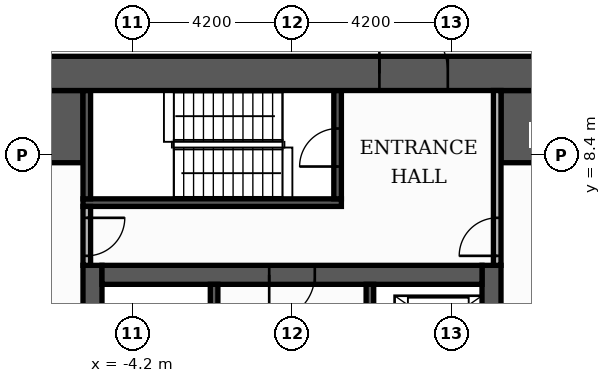
"""IFC4 building model, lengths in metres.
Left out: names, types, materials, properties, quantities, classifications, styles, units other than length and angle.
Written with IfcOpenShell. Run it as: python <this file> out.ifc"""

import sys

from ifc_helpers import new_model, si_unit, direction, frame, frame_2d, origin, place, context, subcontext, project, spatial, rectangle, extrude, element, fill, save


model = new_model("IFC4")
c1 = context("Model", 3, precision=1e-05, world=origin(), true_north=direction((0.0, 1.0)))
c2 = subcontext(c1, "Body", "Model", "MODEL_VIEW")
j1 = project(units=[si_unit("LENGTHUNIT", "METRE"), si_unit("PLANEANGLEUNIT", "RADIAN")], contexts=[c1])
p1 = place(None, origin())
s1 = spatial("IfcSite", under=j1, at=p1, CompositionType="ELEMENT")
p2 = place(p1, origin())
s2 = spatial("IfcBuilding", under=s1, at=p2, CompositionType="ELEMENT")
p3 = place(p2, frame((0.0, 0.0, -4.2)))
s3 = spatial("IfcBuildingStorey", under=s2, at=p3, CompositionType="ELEMENT", Elevation=-4.2)
for number, where, z_axis, x_axis in (
    (1, (-5.25, -5.0, 0.0), (0.0, 0.0, 1.0), (0.0, 1.0, 0.0)),
    (2, (5.25, -5.0, 0.0), (0.0, 0.0, 1.0), (0.0, 1.0, 0.0)),
):
    element("IfcWall", number, at=place(p3, frame(where, z_axis=z_axis, x_axis=x_axis)), inside=s3, PredefinedType="SHEAR", context=c2, shape_type="SweptSolid", body=[
        extrude(rectangle(XDim=10.5, YDim=0.5, at=frame_2d((5.25, 0.0))), origin(), (0.0, 0.0, 1.0), 3.78),
    ])
p4 = place(p3, frame((-5.0, 5.25, 0.0), z_axis=(0.0, 0.0, 1.0), x_axis=(1.0, 0.0, 0.0)))
e3 = element("IfcWall", 3, at=p4, inside=s3, PredefinedType="SHEAR", context=c2, shape_type="SweptSolid", body=[
    extrude(rectangle(XDim=10.0, YDim=0.5, at=frame_2d((5.0, 0.0))), origin(), (0.0, 0.0, 1.0), 3.78),
])
p5 = place(p4, frame((4.4, 0.0, 0.0)))
e4 = element("IfcOpeningElement", 4, at=p5, cuts=e3, PredefinedType="OPENING", context=c2, shape_type="SweptSolid", body=[
    extrude(rectangle(XDim=1.2, YDim=2.1, at=frame_2d((0.6, 1.05))), frame((0.0, 0.26, 0.0), z_axis=(0.0, -1.0, 0.0), x_axis=(1.0, 0.0, 0.0)), (0.0, 0.0, 1.0), 0.52),
])
for number, where, z_axis, x_axis in (
    (5, (-10.1, 9.15, 0.0), (0.0, 0.0, 1.0), (1.0, 0.0, 0.0)),
    (6, (5.5, 9.15, 0.0), (0.0, 0.0, 1.0), (1.0, 0.0, 0.0)),
):
    element("IfcWall", number, at=place(p3, frame(where, z_axis=z_axis, x_axis=x_axis)), inside=s3, PredefinedType="SHEAR", context=c2, shape_type="SweptSolid", body=[
        extrude(rectangle(XDim=4.6, YDim=1.9, at=frame_2d((2.3, 0.0))), origin(), (0.0, 0.0, 1.0), 3.78),
    ])
p6 = place(p3, frame((-2.05, -1.4, 0.0), z_axis=(0.0, 0.0, 1.0), x_axis=(0.0, 1.0, 0.0)))
e7 = element("IfcWall", 7, at=p6, inside=s3, PredefinedType="SHEAR", context=c2, shape_type="SweptSolid", body=[
    extrude(rectangle(XDim=6.4, YDim=0.2, at=frame_2d((3.2, 0.0))), origin(), (0.0, 0.0, 1.0), 3.78),
])
p7 = place(p6, frame((0.15, 0.0, 0.0)))
e8 = element("IfcOpeningElement", 8, at=p7, cuts=e7, PredefinedType="OPENING", context=c2, shape_type="SweptSolid", body=[
    extrude(rectangle(XDim=1.0, YDim=2.1, at=frame_2d((0.5, 1.05))), frame((0.0, 0.11, 0.0), z_axis=(0.0, -1.0, 0.0), x_axis=(1.0, 0.0, 0.0)), (0.0, 0.0, 1.0), 0.22),
])
p8 = place(p3, frame((-5.5, 7.15, 0.0), z_axis=(0.0, 0.0, 1.0), x_axis=(1.0, 0.0, 0.0)))
e9 = element("IfcWall", 9, at=p8, inside=s3, PredefinedType="SHEAR", context=c2, shape_type="SweptSolid", body=[
    extrude(rectangle(XDim=6.8, YDim=0.2, at=frame_2d((3.4, 0.0))), origin(), (0.0, 0.0, 1.0), 3.78),
])
p9 = place(p3, frame((-5.4, 7.25, 0.0), z_axis=(0.0, 0.0, 1.0), x_axis=(0.0, 1.0, 0.0)))
e10 = element("IfcWall", 10, at=p9, inside=s3, PredefinedType="SHEAR", context=c2, shape_type="SweptSolid", body=[
    extrude(rectangle(XDim=2.85, YDim=0.2, at=frame_2d((1.425, 0.0))), origin(), (0.0, 0.0, 1.0), 3.78),
])
p10 = place(p3, frame((1.2, 7.25, 0.0), z_axis=(0.0, 0.0, 1.0), x_axis=(0.0, 1.0, 0.0)))
e11 = element("IfcWall", 11, at=p10, inside=s3, PredefinedType="SHEAR", context=c2, shape_type="SweptSolid", body=[
    extrude(rectangle(XDim=2.85, YDim=0.2, at=frame_2d((1.425, 0.0))), origin(), (0.0, 0.0, 1.0), 3.78),
])
p11 = place(p10, frame((0.85, 0.0, 0.0)))
e12 = element("IfcOpeningElement", 12, at=p11, cuts=e11, PredefinedType="OPENING", context=c2, shape_type="SweptSolid", body=[
    extrude(rectangle(XDim=1.0, YDim=2.1, at=frame_2d((0.5, 1.05))), frame((0.0, 0.11, 0.0), z_axis=(0.0, -1.0, 0.0), x_axis=(1.0, 0.0, 0.0)), (0.0, 0.0, 1.0), 0.22),
])
p12 = place(p3, frame((2.05, 1.6, 0.0), z_axis=(0.0, 0.0, 1.0), x_axis=(0.0, 1.0, 0.0)))
e13 = element("IfcWall", 13, at=p12, inside=s3, PredefinedType="SHEAR", context=c2, shape_type="SweptSolid", body=[
    extrude(rectangle(XDim=3.4, YDim=0.2, at=frame_2d((1.7, 0.0))), origin(), (0.0, 0.0, 1.0), 3.78),
])
p13 = place(p12, frame((1.75, 0.0, 0.0)))
e14 = element("IfcOpeningElement", 14, at=p13, cuts=e13, PredefinedType="OPENING", context=c2, shape_type="SweptSolid", body=[
    extrude(rectangle(XDim=1.1, YDim=2.1, at=frame_2d((0.55, 1.05))), frame((0.0, 0.11, 0.0), z_axis=(0.0, -1.0, 0.0), x_axis=(1.0, 0.0, 0.0)), (0.0, 0.0, 1.0), 0.22),
])
p14 = place(p12, frame((0.15, 0.0, 0.0)))
e15 = element("IfcOpeningElement", 15, at=p14, cuts=e13, PredefinedType="OPENING", context=c2, shape_type="SweptSolid", body=[
    extrude(rectangle(XDim=0.8, YDim=2.1, at=frame_2d((0.4, 1.05))), frame((0.0, 0.11, 0.0), z_axis=(0.0, -1.0, 0.0), x_axis=(1.0, 0.0, 0.0)), (0.0, 0.0, 1.0), 0.22),
])
p15 = place(p3, frame((-11.0, 10.55, 0.0), z_axis=(0.0, 0.0, 1.0), x_axis=(1.0, 0.0, 0.0)))
e16 = element("IfcWall", 16, at=p15, inside=s3, PredefinedType="SHEAR", context=c2, shape_type="SweptSolid", body=[
    extrude(rectangle(XDim=22.0, YDim=0.9, at=frame_2d((11.0, 0.0))), origin(), (0.0, 0.0, 1.0), 3.78),
])
p16 = place(p15, frame((13.3, 0.0, 0.0)))
e17 = element("IfcOpeningElement", 17, at=p16, cuts=e16, PredefinedType="OPENING", context=c2, shape_type="SweptSolid", body=[
    extrude(rectangle(XDim=1.8, YDim=2.2, at=frame_2d((0.9, 1.1))), frame((0.0, 0.46, 0.0), z_axis=(0.0, -1.0, 0.0), x_axis=(1.0, 0.0, 0.0)), (0.0, 0.0, 1.0), 0.92),
])
p17 = place(p3, frame((-5.4, 5.5, 0.0), z_axis=(0.0, 0.0, 1.0), x_axis=(0.0, 1.0, 0.0)))
e18 = element("IfcWall", 18, at=p17, inside=s3, PredefinedType="PARTITIONING", context=c2, shape_type="SweptSolid", body=[
    extrude(rectangle(XDim=1.55, YDim=0.2, at=frame_2d((0.775, 0.0))), origin(), (0.0, 0.0, 1.0), 3.78),
])
p18 = place(p17, frame((0.25, 0.0, 0.0)))
e19 = element("IfcOpeningElement", 19, at=p18, cuts=e18, PredefinedType="OPENING", context=c2, shape_type="SweptSolid", body=[
    extrude(rectangle(XDim=1.0, YDim=2.1, at=frame_2d((0.5, 1.05))), frame((0.0, 0.11, 0.0), z_axis=(0.0, -1.0, 0.0), x_axis=(1.0, 0.0, 0.0)), (0.0, 0.0, 1.0), 0.22),
])
p19 = place(p3, frame((5.4, 5.5, 0.0), z_axis=(0.0, 0.0, 1.0), x_axis=(0.0, 1.0, 0.0)))
e20 = element("IfcWall", 20, at=p19, inside=s3, PredefinedType="PARTITIONING", context=c2, shape_type="SweptSolid", body=[
    extrude(rectangle(XDim=4.6, YDim=0.2, at=frame_2d((2.3, 0.0))), origin(), (0.0, 0.0, 1.0), 3.78),
])
p20 = place(p19, frame((0.25, 0.0, 0.0)))
e21 = element("IfcOpeningElement", 21, at=p20, cuts=e20, PredefinedType="OPENING", context=c2, shape_type="SweptSolid", body=[
    extrude(rectangle(XDim=1.0, YDim=2.1, at=frame_2d((0.5, 1.05))), frame((0.0, 0.11, 0.0), z_axis=(0.0, -1.0, 0.0), x_axis=(1.0, 0.0, 0.0)), (0.0, 0.0, 1.0), 0.22),
])
p21 = place(p5, frame((1.2, 0.0, 0.0), z_axis=(0.0, 0.0, 1.0), x_axis=(-1.0, 0.0, 0.0)))
e22 = element("IfcDoor", 22, at=p21, inside=s3, OperationType="SINGLE_SWING_LEFT", PredefinedType="DOOR", context=c2, shape_type="SweptSolid", body=[
    extrude(rectangle(XDim=1.2, YDim=2.1, at=frame_2d((0.6, 1.05))), frame((0.0, 0.025, 0.0), z_axis=(0.0, -1.0, 0.0), x_axis=(1.0, 0.0, 0.0)), (0.0, 0.0, 1.0), 0.05),
])
fill(e4, e22)
p22 = place(p11, origin())
e23 = element("IfcDoor", 23, at=p22, inside=s3, OperationType="SINGLE_SWING_LEFT", PredefinedType="DOOR", context=c2, shape_type="SweptSolid", body=[
    extrude(rectangle(XDim=1.0, YDim=2.1, at=frame_2d((0.5, 1.05))), frame((0.0, 0.025, 0.0), z_axis=(0.0, -1.0, 0.0), x_axis=(1.0, 0.0, 0.0)), (0.0, 0.0, 1.0), 0.05),
])
fill(e12, e23)
p23 = place(p18, frame((1.0, 0.0, 0.0), z_axis=(0.0, 0.0, 1.0), x_axis=(-1.0, 0.0, 0.0)))
e24 = element("IfcDoor", 24, at=p23, inside=s3, OperationType="SINGLE_SWING_RIGHT", PredefinedType="DOOR", context=c2, shape_type="SweptSolid", body=[
    extrude(rectangle(XDim=1.0, YDim=2.1, at=frame_2d((0.5, 1.05))), frame((0.0, 0.025, 0.0), z_axis=(0.0, -1.0, 0.0), x_axis=(1.0, 0.0, 0.0)), (0.0, 0.0, 1.0), 0.05),
])
fill(e19, e24)
p24 = place(p20, origin())
e25 = element("IfcDoor", 25, at=p24, inside=s3, OperationType="SINGLE_SWING_LEFT", PredefinedType="DOOR", context=c2, shape_type="SweptSolid", body=[
    extrude(rectangle(XDim=1.0, YDim=2.1, at=frame_2d((0.5, 1.05))), frame((0.0, 0.025, 0.0), z_axis=(0.0, -1.0, 0.0), x_axis=(1.0, 0.0, 0.0)), (0.0, 0.0, 1.0), 0.05),
])
fill(e21, e25)
p25 = place(p16, origin())
e26 = element("IfcDoor", 26, at=p25, inside=s3, OperationType="DOUBLE_DOOR_SINGLE_SWING", PredefinedType="DOOR", context=c2, shape_type="SweptSolid", body=[
    extrude(rectangle(XDim=1.8, YDim=2.2, at=frame_2d((0.9, 1.1))), frame((0.0, 0.025, 0.0), z_axis=(0.0, -1.0, 0.0), x_axis=(1.0, 0.0, 0.0)), (0.0, 0.0, 1.0), 0.05),
])
fill(e17, e26)
save(model, sys.argv[1])
